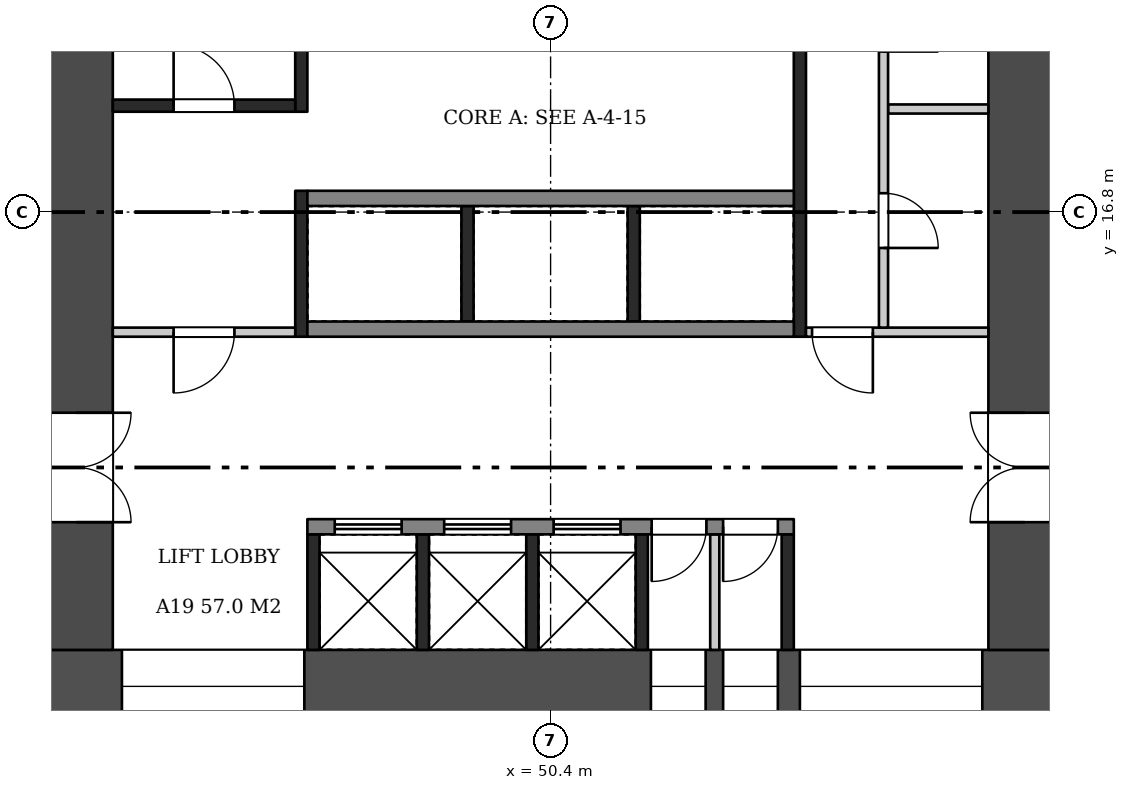
"""IFC4 building model, lengths in metres.
Left out: names, types, materials, properties, quantities, classifications, styles, units other than length and angle.
Written with IfcOpenShell. Run it as: python <this file> out.ifc"""

import sys

from ifc_helpers import new_model, si_unit, direction, frame, frame_2d, origin, place, context, subcontext, project, spatial, rectangle, extrude, element, fill, save


model = new_model("IFC4")
c1 = context("Model", 3, precision=1e-05, world=origin(), true_north=direction((0.0, 1.0)))
c2 = subcontext(c1, "Body", "Model", "MODEL_VIEW")
j1 = project(units=[si_unit("LENGTHUNIT", "METRE"), si_unit("PLANEANGLEUNIT", "RADIAN")], contexts=[c1])
p1 = place(None, origin())
s1 = spatial("IfcSite", under=j1, at=p1, CompositionType="ELEMENT")
p2 = place(p1, origin())
s2 = spatial("IfcBuilding", under=s1, at=p2, CompositionType="ELEMENT")
p3 = place(p2, frame((0.0, 0.0, 81.2)))
s3 = spatial("IfcBuildingStorey", under=s2, at=p3, CompositionType="ELEMENT", Elevation=81.2)
p4 = place(p3, frame((42.0, 9.0, 0.0), z_axis=(0.0, 0.0, 1.0), x_axis=(1.0, 0.0, 0.0)))
e1 = element("IfcWall", 1, at=p4, inside=s3, PredefinedType="SHEAR", context=c2, shape_type="SweptSolid", body=[
    extrude(rectangle(XDim=16.8, YDim=1.2, at=frame_2d((8.4, 0.0))), origin(), (0.0, 0.0, 1.0), 3.22),
])
p5 = place(p4, frame((1.35, 0.0, 0.6)))
e2 = element("IfcOpeningElement", 2, at=p5, cuts=e1, PredefinedType="OPENING", context=c2, shape_type="SweptSolid", body=[
    extrude(rectangle(XDim=3.0, YDim=2.1, at=frame_2d((1.5, 1.05))), frame((0.0, 0.61, 0.0), z_axis=(0.0, -1.0, 0.0), x_axis=(1.0, 0.0, 0.0)), (0.0, 0.0, 1.0), 1.22),
])
p6 = place(p4, frame((10.05, 0.0, 1.6)))
e3 = element("IfcOpeningElement", 3, at=p6, cuts=e1, PredefinedType="OPENING", context=c2, shape_type="SweptSolid", body=[
    extrude(rectangle(XDim=0.9, YDim=1.2, at=frame_2d((0.45, 0.6))), frame((0.0, 0.61, 0.0), z_axis=(0.0, -1.0, 0.0), x_axis=(1.0, 0.0, 0.0)), (0.0, 0.0, 1.0), 1.22),
])
p7 = place(p4, frame((11.238, 0.0, 1.6)))
e4 = element("IfcOpeningElement", 4, at=p7, cuts=e1, PredefinedType="OPENING", context=c2, shape_type="SweptSolid", body=[
    extrude(rectangle(XDim=0.9, YDim=1.2, at=frame_2d((0.45, 0.6))), frame((0.0, 0.61, 0.0), z_axis=(0.0, -1.0, 0.0), x_axis=(1.0, 0.0, 0.0)), (0.0, 0.0, 1.0), 1.22),
])
p8 = place(p4, frame((12.5, 0.0, 0.6)))
e5 = element("IfcOpeningElement", 5, at=p8, cuts=e1, PredefinedType="OPENING", context=c2, shape_type="SweptSolid", body=[
    extrude(rectangle(XDim=3.0, YDim=2.1, at=frame_2d((1.5, 1.05))), frame((0.0, 0.61, 0.0), z_axis=(0.0, -1.0, 0.0), x_axis=(1.0, 0.0, 0.0)), (0.0, 0.0, 1.0), 1.22),
])
p9 = place(p3, frame((42.6, 9.6, 0.0), z_axis=(0.0, 0.0, 1.0), x_axis=(0.0, 1.0, 0.0)))
e6 = element("IfcWall", 6, at=p9, inside=s3, PredefinedType="SHEAR", context=c2, shape_type="SweptSolid", body=[
    extrude(rectangle(XDim=14.4, YDim=1.2, at=frame_2d((7.2, 0.0))), origin(), (0.0, 0.0, 1.0), 3.22),
])
p10 = place(p9, frame((2.1, 0.0, 0.0)))
e7 = element("IfcOpeningElement", 7, at=p10, cuts=e6, PredefinedType="OPENING", context=c2, shape_type="SweptSolid", body=[
    extrude(rectangle(XDim=1.8, YDim=2.1, at=frame_2d((0.9, 1.05))), frame((0.0, 0.61, 0.0), z_axis=(0.0, -1.0, 0.0), x_axis=(1.0, 0.0, 0.0)), (0.0, 0.0, 1.0), 1.22),
])
p11 = place(p3, frame((58.2, 9.6, 0.0), z_axis=(0.0, 0.0, 1.0), x_axis=(0.0, 1.0, 0.0)))
e8 = element("IfcWall", 8, at=p11, inside=s3, PredefinedType="SHEAR", context=c2, shape_type="SweptSolid", body=[
    extrude(rectangle(XDim=14.4, YDim=1.2, at=frame_2d((7.2, 0.0))), origin(), (0.0, 0.0, 1.0), 3.22),
])
p12 = place(p11, frame((2.1, 0.0, 0.0)))
e9 = element("IfcOpeningElement", 9, at=p12, cuts=e8, PredefinedType="OPENING", context=c2, shape_type="SweptSolid", body=[
    extrude(rectangle(XDim=1.8, YDim=2.1, at=frame_2d((0.9, 1.05))), frame((0.0, 0.61, 0.0), z_axis=(0.0, -1.0, 0.0), x_axis=(1.0, 0.0, 0.0)), (0.0, 0.0, 1.0), 1.22),
])
for number, where, z_axis, x_axis in (
    (10, (46.5, 9.6, 0.0), (0.0, 0.0, 1.0), (0.0, 1.0, 0.0)),
    (11, (48.3, 9.6, 0.0), (0.0, 0.0, 1.0), (0.0, 1.0, 0.0)),
    (12, (50.1, 9.6, 0.0), (0.0, 0.0, 1.0), (0.0, 1.0, 0.0)),
    (13, (51.9, 9.6, 0.0), (0.0, 0.0, 1.0), (0.0, 1.0, 0.0)),
    (14, (54.3, 9.6, 0.0), (0.0, 0.0, 1.0), (0.0, 1.0, 0.0)),
):
    element("IfcWall", number, at=place(p3, frame(where, z_axis=z_axis, x_axis=x_axis)), inside=s3, PredefinedType="SHEAR", context=c2, shape_type="SweptSolid", body=[
        extrude(rectangle(XDim=1.9, YDim=0.2, at=frame_2d((0.95, 0.0))), origin(), (0.0, 0.0, 1.0), 3.22),
    ])
p13 = place(p3, frame((53.1, 9.6, 0.0), z_axis=(0.0, 0.0, 1.0), x_axis=(0.0, 1.0, 0.0)))
e15 = element("IfcWall", 15, at=p13, inside=s3, PredefinedType="PARTITIONING", context=c2, shape_type="SweptSolid", body=[
    extrude(rectangle(XDim=1.9, YDim=0.15, at=frame_2d((0.95, 0.0))), origin(), (0.0, 0.0, 1.0), 3.22),
])
p14 = place(p3, frame((46.4, 11.625, 0.0), z_axis=(0.0, 0.0, 1.0), x_axis=(1.0, 0.0, 0.0)))
e16 = element("IfcWall", 16, at=p14, inside=s3, PredefinedType="SHEAR", context=c2, shape_type="SweptSolid", body=[
    extrude(rectangle(XDim=8.0, YDim=0.25, at=frame_2d((4.0, 0.0))), origin(), (0.0, 0.0, 1.0), 3.22),
])
p15 = place(p14, frame((0.45, 0.0, 0.0)))
e17 = element("IfcOpeningElement", 17, at=p15, cuts=e16, PredefinedType="OPENING", context=c2, shape_type="SweptSolid", body=[
    extrude(rectangle(XDim=1.1, YDim=2.1, at=frame_2d((0.55, 1.05))), frame((0.0, 0.135, 0.0), z_axis=(0.0, -1.0, 0.0), x_axis=(1.0, 0.0, 0.0)), (0.0, 0.0, 1.0), 0.27),
])
p16 = place(p14, frame((2.25, 0.0, 0.0)))
e18 = element("IfcOpeningElement", 18, at=p16, cuts=e16, PredefinedType="OPENING", context=c2, shape_type="SweptSolid", body=[
    extrude(rectangle(XDim=1.1, YDim=2.1, at=frame_2d((0.55, 1.05))), frame((0.0, 0.135, 0.0), z_axis=(0.0, -1.0, 0.0), x_axis=(1.0, 0.0, 0.0)), (0.0, 0.0, 1.0), 0.27),
])
p17 = place(p14, frame((4.05, 0.0, 0.0)))
e19 = element("IfcOpeningElement", 19, at=p17, cuts=e16, PredefinedType="OPENING", context=c2, shape_type="SweptSolid", body=[
    extrude(rectangle(XDim=1.1, YDim=2.1, at=frame_2d((0.55, 1.05))), frame((0.0, 0.135, 0.0), z_axis=(0.0, -1.0, 0.0), x_axis=(1.0, 0.0, 0.0)), (0.0, 0.0, 1.0), 0.27),
])
p18 = place(p14, frame((5.663, 0.0, 0.0)))
e20 = element("IfcOpeningElement", 20, at=p18, cuts=e16, PredefinedType="OPENING", context=c2, shape_type="SweptSolid", body=[
    extrude(rectangle(XDim=0.9, YDim=2.1, at=frame_2d((0.45, 1.05))), frame((0.0, 0.135, 0.0), z_axis=(0.0, -1.0, 0.0), x_axis=(1.0, 0.0, 0.0)), (0.0, 0.0, 1.0), 0.27),
])
p19 = place(p14, frame((6.837, 0.0, 0.0)))
e21 = element("IfcOpeningElement", 21, at=p19, cuts=e16, PredefinedType="OPENING", context=c2, shape_type="SweptSolid", body=[
    extrude(rectangle(XDim=0.9, YDim=2.1, at=frame_2d((0.45, 1.05))), frame((0.0, 0.135, 0.0), z_axis=(0.0, -1.0, 0.0), x_axis=(1.0, 0.0, 0.0)), (0.0, 0.0, 1.0), 0.27),
])
for number, where, z_axis, x_axis in (
    (22, (49.033, 15.0, 0.0), (0.0, 0.0, 1.0), (0.0, 1.0, 0.0)),
    (23, (51.767, 15.0, 0.0), (0.0, 0.0, 1.0), (0.0, 1.0, 0.0)),
):
    element("IfcWall", number, at=place(p3, frame(where, z_axis=z_axis, x_axis=x_axis)), inside=s3, PredefinedType="SHEAR", context=c2, shape_type="SweptSolid", body=[
        extrude(rectangle(XDim=1.9, YDim=0.2, at=frame_2d((0.95, 0.0))), origin(), (0.0, 0.0, 1.0), 3.22),
    ])
for number, where, z_axis, x_axis in (
    (24, (46.4, 14.875, 0.0), (0.0, 0.0, 1.0), (1.0, 0.0, 0.0)),
    (25, (46.4, 17.025, 0.0), (0.0, 0.0, 1.0), (1.0, 0.0, 0.0)),
):
    element("IfcWall", number, at=place(p3, frame(where, z_axis=z_axis, x_axis=x_axis)), inside=s3, PredefinedType="SHEAR", context=c2, shape_type="SweptSolid", body=[
        extrude(rectangle(XDim=8.0, YDim=0.25, at=frame_2d((4.0, 0.0))), origin(), (0.0, 0.0, 1.0), 3.22),
    ])
p20 = place(p3, frame((46.3, 14.75, 0.0), z_axis=(0.0, 0.0, 1.0), x_axis=(0.0, 1.0, 0.0)))
e26 = element("IfcWall", 26, at=p20, inside=s3, PredefinedType="SHEAR", context=c2, shape_type="SweptSolid", body=[
    extrude(rectangle(XDim=2.4, YDim=0.2, at=frame_2d((1.2, 0.0))), origin(), (0.0, 0.0, 1.0), 3.22),
])
p21 = place(p3, frame((46.3, 18.45, 0.0), z_axis=(0.0, 0.0, 1.0), x_axis=(0.0, 1.0, 0.0)))
e27 = element("IfcWall", 27, at=p21, inside=s3, PredefinedType="SHEAR", context=c2, shape_type="SweptSolid", body=[
    extrude(rectangle(XDim=5.55, YDim=0.2, at=frame_2d((2.775, 0.0))), origin(), (0.0, 0.0, 1.0), 3.22),
])
p22 = place(p3, frame((43.2, 14.825, 0.0), z_axis=(0.0, 0.0, 1.0), x_axis=(1.0, 0.0, 0.0)))
e28 = element("IfcWall", 28, at=p22, inside=s3, PredefinedType="PARTITIONING", context=c2, shape_type="SweptSolid", body=[
    extrude(rectangle(XDim=3.0, YDim=0.15, at=frame_2d((1.5, 0.0))), origin(), (0.0, 0.0, 1.0), 3.22),
])
p23 = place(p22, frame((1.0, 0.0, 0.0)))
e29 = element("IfcOpeningElement", 29, at=p23, cuts=e28, PredefinedType="OPENING", context=c2, shape_type="SweptSolid", body=[
    extrude(rectangle(XDim=1.0, YDim=2.1, at=frame_2d((0.5, 1.05))), frame((0.0, 0.085, 0.0), z_axis=(0.0, -1.0, 0.0), x_axis=(1.0, 0.0, 0.0)), (0.0, 0.0, 1.0), 0.17),
])
p24 = place(p3, frame((43.2, 18.55, 0.0), z_axis=(0.0, 0.0, 1.0), x_axis=(1.0, 0.0, 0.0)))
e30 = element("IfcWall", 30, at=p24, inside=s3, PredefinedType="SHEAR", context=c2, shape_type="SweptSolid", body=[
    extrude(rectangle(XDim=3.0, YDim=0.2, at=frame_2d((1.5, 0.0))), origin(), (0.0, 0.0, 1.0), 3.22),
])
p25 = place(p24, frame((1.0, 0.0, 0.0)))
e31 = element("IfcOpeningElement", 31, at=p25, cuts=e30, PredefinedType="OPENING", context=c2, shape_type="SweptSolid", body=[
    extrude(rectangle(XDim=1.0, YDim=2.1, at=frame_2d((0.5, 1.05))), frame((0.0, 0.11, 0.0), z_axis=(0.0, -1.0, 0.0), x_axis=(1.0, 0.0, 0.0)), (0.0, 0.0, 1.0), 0.22),
])
p26 = place(p3, frame((54.5, 14.75, 0.0), z_axis=(0.0, 0.0, 1.0), x_axis=(0.0, 1.0, 0.0)))
e32 = element("IfcWall", 32, at=p26, inside=s3, PredefinedType="SHEAR", context=c2, shape_type="SweptSolid", body=[
    extrude(rectangle(XDim=9.25, YDim=0.2, at=frame_2d((4.625, 0.0))), origin(), (0.0, 0.0, 1.0), 3.22),
])
p27 = place(p3, frame((54.6, 14.825, 0.0), z_axis=(0.0, 0.0, 1.0), x_axis=(1.0, 0.0, 0.0)))
e33 = element("IfcWall", 33, at=p27, inside=s3, PredefinedType="PARTITIONING", context=c2, shape_type="SweptSolid", body=[
    extrude(rectangle(XDim=3.0, YDim=0.15, at=frame_2d((1.5, 0.0))), origin(), (0.0, 0.0, 1.0), 3.22),
])
p28 = place(p27, frame((0.1, 0.0, 0.0)))
e34 = element("IfcOpeningElement", 34, at=p28, cuts=e33, PredefinedType="OPENING", context=c2, shape_type="SweptSolid", body=[
    extrude(rectangle(XDim=1.0, YDim=2.1, at=frame_2d((0.5, 1.05))), frame((0.0, 0.085, 0.0), z_axis=(0.0, -1.0, 0.0), x_axis=(1.0, 0.0, 0.0)), (0.0, 0.0, 1.0), 0.17),
])
p29 = place(p3, frame((55.95, 18.495, 0.0), z_axis=(0.0, 0.0, 1.0), x_axis=(1.0, 0.0, 0.0)))
e35 = element("IfcWall", 35, at=p29, inside=s3, PredefinedType="PARTITIONING", context=c2, shape_type="SweptSolid", body=[
    extrude(rectangle(XDim=1.65, YDim=0.15, at=frame_2d((0.825, 0.0))), origin(), (0.0, 0.0, 1.0), 3.22),
])
p30 = place(p3, frame((55.875, 14.9, 0.0), z_axis=(0.0, 0.0, 1.0), x_axis=(0.0, 1.0, 0.0)))
e36 = element("IfcWall", 36, at=p30, inside=s3, PredefinedType="PARTITIONING", context=c2, shape_type="SweptSolid", body=[
    extrude(rectangle(XDim=9.1, YDim=0.15, at=frame_2d((4.55, 0.0))), origin(), (0.0, 0.0, 1.0), 3.22),
])
p31 = place(p30, frame((1.31, 0.0, 0.0)))
e37 = element("IfcOpeningElement", 37, at=p31, cuts=e36, PredefinedType="OPENING", context=c2, shape_type="SweptSolid", body=[
    extrude(rectangle(XDim=0.9, YDim=2.1, at=frame_2d((0.45, 1.05))), frame((0.0, 0.085, 0.0), z_axis=(0.0, -1.0, 0.0), x_axis=(1.0, 0.0, 0.0)), (0.0, 0.0, 1.0), 0.17),
])
p32 = place(p30, frame((4.54, 0.0, 0.0)))
e38 = element("IfcOpeningElement", 38, at=p32, cuts=e36, PredefinedType="OPENING", context=c2, shape_type="SweptSolid", body=[
    extrude(rectangle(XDim=0.9, YDim=2.1, at=frame_2d((0.45, 1.05))), frame((0.0, 0.085, 0.0), z_axis=(0.0, -1.0, 0.0), x_axis=(1.0, 0.0, 0.0)), (0.0, 0.0, 1.0), 0.17),
])
p33 = place(p30, frame((7.33, 0.0, 0.0)))
e39 = element("IfcOpeningElement", 39, at=p33, cuts=e36, PredefinedType="OPENING", context=c2, shape_type="SweptSolid", body=[
    extrude(rectangle(XDim=0.9, YDim=2.1, at=frame_2d((0.45, 1.05))), frame((0.0, 0.085, 0.0), z_axis=(0.0, -1.0, 0.0), x_axis=(1.0, 0.0, 0.0)), (0.0, 0.0, 1.0), 0.17),
])
p34 = place(p10, frame((1.8, 0.0, 0.0), z_axis=(0.0, 0.0, 1.0), x_axis=(-1.0, 0.0, 0.0)))
e40 = element("IfcDoor", 40, at=p34, inside=s3, OperationType="DOUBLE_DOOR_SINGLE_SWING", PredefinedType="DOOR", context=c2, shape_type="SweptSolid", body=[
    extrude(rectangle(XDim=1.8, YDim=2.1, at=frame_2d((0.9, 1.05))), frame((0.0, 0.025, 0.0), z_axis=(0.0, -1.0, 0.0), x_axis=(1.0, 0.0, 0.0)), (0.0, 0.0, 1.0), 0.05),
])
fill(e7, e40)
p35 = place(p12, origin())
e41 = element("IfcDoor", 41, at=p35, inside=s3, OperationType="DOUBLE_DOOR_SINGLE_SWING", PredefinedType="DOOR", context=c2, shape_type="SweptSolid", body=[
    extrude(rectangle(XDim=1.8, YDim=2.1, at=frame_2d((0.9, 1.05))), frame((0.0, 0.025, 0.0), z_axis=(0.0, -1.0, 0.0), x_axis=(1.0, 0.0, 0.0)), (0.0, 0.0, 1.0), 0.05),
])
fill(e9, e41)
p36 = place(p15, origin())
e42 = element("IfcDoor", 42, at=p36, inside=s3, OperationType="DOUBLE_DOOR_SLIDING", PredefinedType="DOOR", context=c2, shape_type="SweptSolid", body=[
    extrude(rectangle(XDim=1.1, YDim=2.1, at=frame_2d((0.55, 1.05))), frame((0.0, 0.025, 0.0), z_axis=(0.0, -1.0, 0.0), x_axis=(1.0, 0.0, 0.0)), (0.0, 0.0, 1.0), 0.05),
])
fill(e17, e42)
p37 = place(p16, origin())
e43 = element("IfcDoor", 43, at=p37, inside=s3, OperationType="DOUBLE_DOOR_SLIDING", PredefinedType="DOOR", context=c2, shape_type="SweptSolid", body=[
    extrude(rectangle(XDim=1.1, YDim=2.1, at=frame_2d((0.55, 1.05))), frame((0.0, 0.025, 0.0), z_axis=(0.0, -1.0, 0.0), x_axis=(1.0, 0.0, 0.0)), (0.0, 0.0, 1.0), 0.05),
])
fill(e18, e43)
p38 = place(p17, origin())
e44 = element("IfcDoor", 44, at=p38, inside=s3, OperationType="DOUBLE_DOOR_SLIDING", PredefinedType="DOOR", context=c2, shape_type="SweptSolid", body=[
    extrude(rectangle(XDim=1.1, YDim=2.1, at=frame_2d((0.55, 1.05))), frame((0.0, 0.025, 0.0), z_axis=(0.0, -1.0, 0.0), x_axis=(1.0, 0.0, 0.0)), (0.0, 0.0, 1.0), 0.05),
])
fill(e19, e44)
p39 = place(p18, frame((0.9, 0.0, 0.0), z_axis=(0.0, 0.0, 1.0), x_axis=(-1.0, 0.0, 0.0)))
e45 = element("IfcDoor", 45, at=p39, inside=s3, OperationType="SINGLE_SWING_RIGHT", PredefinedType="DOOR", context=c2, shape_type="SweptSolid", body=[
    extrude(rectangle(XDim=0.9, YDim=2.1, at=frame_2d((0.45, 1.05))), frame((0.0, 0.025, 0.0), z_axis=(0.0, -1.0, 0.0), x_axis=(1.0, 0.0, 0.0)), (0.0, 0.0, 1.0), 0.05),
])
fill(e20, e45)
p40 = place(p19, frame((0.9, 0.0, 0.0), z_axis=(0.0, 0.0, 1.0), x_axis=(-1.0, 0.0, 0.0)))
e46 = element("IfcDoor", 46, at=p40, inside=s3, OperationType="SINGLE_SWING_RIGHT", PredefinedType="DOOR", context=c2, shape_type="SweptSolid", body=[
    extrude(rectangle(XDim=0.9, YDim=2.1, at=frame_2d((0.45, 1.05))), frame((0.0, 0.025, 0.0), z_axis=(0.0, -1.0, 0.0), x_axis=(1.0, 0.0, 0.0)), (0.0, 0.0, 1.0), 0.05),
])
fill(e21, e46)
p41 = place(p23, frame((1.0, 0.0, 0.0), z_axis=(0.0, 0.0, 1.0), x_axis=(-1.0, 0.0, 0.0)))
e47 = element("IfcDoor", 47, at=p41, inside=s3, OperationType="SINGLE_SWING_RIGHT", PredefinedType="DOOR", context=c2, shape_type="SweptSolid", body=[
    extrude(rectangle(XDim=1.0, YDim=2.1, at=frame_2d((0.5, 1.05))), frame((0.0, 0.025, 0.0), z_axis=(0.0, -1.0, 0.0), x_axis=(1.0, 0.0, 0.0)), (0.0, 0.0, 1.0), 0.05),
])
fill(e29, e47)
p42 = place(p25, origin())
e48 = element("IfcDoor", 48, at=p42, inside=s3, OperationType="SINGLE_SWING_LEFT", PredefinedType="DOOR", context=c2, shape_type="SweptSolid", body=[
    extrude(rectangle(XDim=1.0, YDim=2.1, at=frame_2d((0.5, 1.05))), frame((0.0, 0.025, 0.0), z_axis=(0.0, -1.0, 0.0), x_axis=(1.0, 0.0, 0.0)), (0.0, 0.0, 1.0), 0.05),
])
fill(e31, e48)
p43 = place(p28, frame((1.0, 0.0, 0.0), z_axis=(0.0, 0.0, 1.0), x_axis=(-1.0, 0.0, 0.0)))
e49 = element("IfcDoor", 49, at=p43, inside=s3, OperationType="SINGLE_SWING_LEFT", PredefinedType="DOOR", context=c2, shape_type="SweptSolid", body=[
    extrude(rectangle(XDim=1.0, YDim=2.1, at=frame_2d((0.5, 1.05))), frame((0.0, 0.025, 0.0), z_axis=(0.0, -1.0, 0.0), x_axis=(1.0, 0.0, 0.0)), (0.0, 0.0, 1.0), 0.05),
])
fill(e34, e49)
p44 = place(p31, frame((0.9, 0.0, 0.0), z_axis=(0.0, 0.0, 1.0), x_axis=(-1.0, 0.0, 0.0)))
e50 = element("IfcDoor", 50, at=p44, inside=s3, OperationType="SINGLE_SWING_RIGHT", PredefinedType="DOOR", context=c2, shape_type="SweptSolid", body=[
    extrude(rectangle(XDim=0.9, YDim=2.1, at=frame_2d((0.45, 1.05))), frame((0.0, 0.025, 0.0), z_axis=(0.0, -1.0, 0.0), x_axis=(1.0, 0.0, 0.0)), (0.0, 0.0, 1.0), 0.05),
])
fill(e37, e50)
p45 = place(p5, origin())
e51 = element("IfcWindow", 51, at=p45, inside=s3, PartitioningType="SINGLE_PANEL", PredefinedType="WINDOW", context=c2, shape_type="SweptSolid", body=[
    extrude(rectangle(XDim=3.0, YDim=2.1, at=frame_2d((1.5, 1.05))), frame((0.0, 0.03, 0.0), z_axis=(0.0, -1.0, 0.0), x_axis=(1.0, 0.0, 0.0)), (0.0, 0.0, 1.0), 0.06),
])
fill(e2, e51)
p46 = place(p6, origin())
e52 = element("IfcWindow", 52, at=p46, inside=s3, PartitioningType="SINGLE_PANEL", PredefinedType="WINDOW", context=c2, shape_type="SweptSolid", body=[
    extrude(rectangle(XDim=0.9, YDim=1.2, at=frame_2d((0.45, 0.6))), frame((0.0, 0.03, 0.0), z_axis=(0.0, -1.0, 0.0), x_axis=(1.0, 0.0, 0.0)), (0.0, 0.0, 1.0), 0.06),
])
fill(e3, e52)
p47 = place(p7, origin())
e53 = element("IfcWindow", 53, at=p47, inside=s3, PartitioningType="SINGLE_PANEL", PredefinedType="WINDOW", context=c2, shape_type="SweptSolid", body=[
    extrude(rectangle(XDim=0.9, YDim=1.2, at=frame_2d((0.45, 0.6))), frame((0.0, 0.03, 0.0), z_axis=(0.0, -1.0, 0.0), x_axis=(1.0, 0.0, 0.0)), (0.0, 0.0, 1.0), 0.06),
])
fill(e4, e53)
p48 = place(p8, origin())
e54 = element("IfcWindow", 54, at=p48, inside=s3, PartitioningType="SINGLE_PANEL", PredefinedType="WINDOW", context=c2, shape_type="SweptSolid", body=[
    extrude(rectangle(XDim=3.0, YDim=2.1, at=frame_2d((1.5, 1.05))), frame((0.0, 0.03, 0.0), z_axis=(0.0, -1.0, 0.0), x_axis=(1.0, 0.0, 0.0)), (0.0, 0.0, 1.0), 0.06),
])
fill(e5, e54)
save(model, sys.argv[1])
